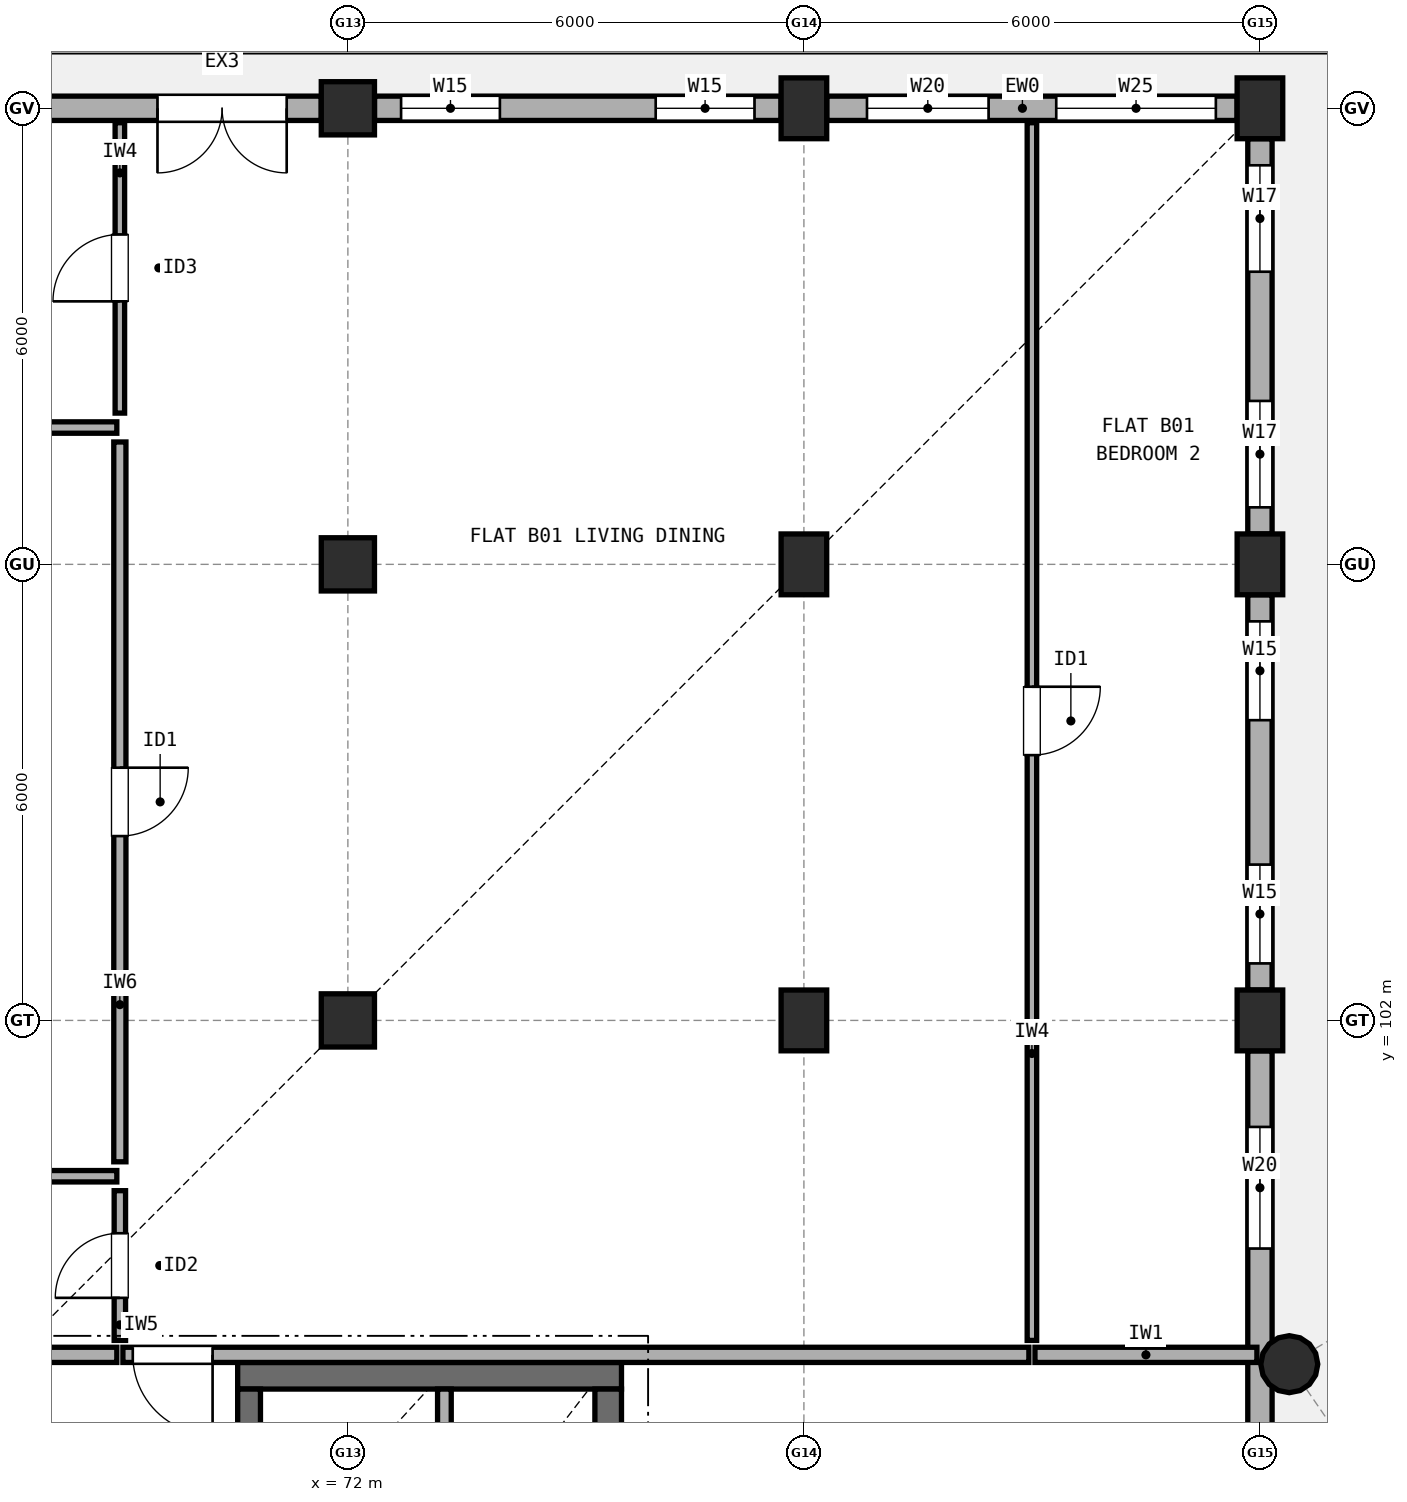
"""IFC4 building model, lengths in metres.
Left out: names, types, materials, properties, quantities, classifications, styles, units other than length and angle.
Written with IfcOpenShell. Run it as: python <this file> out.ifc"""

import sys

from ifc_helpers import new_model, si_unit, direction, frame, frame_2d, origin, origin_2d, place, context, subcontext, project, spatial, rectangle, circle, extrude, element, fill, save


model = new_model("IFC4")
c1 = context("Model", 3, precision=1e-05, world=origin(), true_north=direction((0.0, 1.0)))
c2 = subcontext(c1, "Body", "Model", "MODEL_VIEW")
j1 = project(units=[si_unit("LENGTHUNIT", "METRE"), si_unit("PLANEANGLEUNIT", "RADIAN")], contexts=[c1])
p1 = place(None, origin())
s1 = spatial("IfcSite", under=j1, at=p1, CompositionType="ELEMENT")
p2 = place(p1, origin())
s2 = spatial("IfcBuilding", under=s1, at=p2, CompositionType="ELEMENT")
p3 = place(p2, origin())
s3 = spatial("IfcBuildingStorey", under=s2, at=p3, CompositionType="ELEMENT", Elevation=0.0)
for number, where, z_axis, x_axis in (
    (1, (72.0, 102.0, 0.0), (0.0, 0.0, 1.0), (1.0, 0.0, 0.0)),
    (2, (72.0, 108.0, 0.0), (0.0, 0.0, 1.0), (1.0, 0.0, 0.0)),
    (3, (72.0, 114.0, 0.0), (0.0, 0.0, 1.0), (1.0, 0.0, 0.0)),
):
    element("IfcColumn", number, at=place(p3, frame(where, z_axis=z_axis, x_axis=x_axis)), inside=s3, PredefinedType="COLUMN", context=c2, shape_type="SweptSolid", body=[
        extrude(rectangle(XDim=0.7, YDim=0.7, at=origin_2d()), origin(), (0.0, 0.0, 1.0), 4.23),
    ])
for number, where, z_axis, x_axis in (
    (4, (78.0, 102.0, 0.0), (0.0, 0.0, 1.0), (1.0, 0.0, 0.0)),
    (5, (78.0, 108.0, 0.0), (0.0, 0.0, 1.0), (1.0, 0.0, 0.0)),
    (6, (78.0, 114.0, 0.0), (0.0, 0.0, 1.0), (1.0, 0.0, 0.0)),
    (7, (84.0, 102.0, 0.0), (0.0, 0.0, 1.0), (1.0, 0.0, 0.0)),
    (8, (84.0, 108.0, 0.0), (0.0, 0.0, 1.0), (1.0, 0.0, 0.0)),
    (9, (84.0, 114.0, 0.0), (0.0, 0.0, 1.0), (1.0, 0.0, 0.0)),
):
    element("IfcColumn", number, at=place(p3, frame(where, z_axis=z_axis, x_axis=x_axis)), inside=s3, PredefinedType="COLUMN", context=c2, shape_type="SweptSolid", body=[
        extrude(rectangle(XDim=0.6, YDim=0.8, at=origin_2d()), origin(), (0.0, 0.0, 1.0), 4.23),
    ])
p4 = place(p3, frame((84.386, 97.477, 0.0), z_axis=(0.0, 0.0, 1.0), x_axis=(1.0, 0.0, 0.0)))
e10 = element("IfcColumn", 10, at=p4, inside=s3, PredefinedType="COLUMN", context=c2, shape_type="SweptSolid", body=[
    extrude(circle(Radius=0.375, at=origin_2d()), origin(), (0.0, 0.0, 1.0), 4.248),
])
p5 = place(p3, frame((84.0, 96.4, 0.0), z_axis=(0.0, 0.0, 1.0), x_axis=(0.0, 1.0, 0.0)))
e11 = element("IfcWall", 11, at=p5, inside=s3, PredefinedType="STANDARD", context=c2, shape_type="SweptSolid", body=[
    extrude(rectangle(XDim=5.2, YDim=0.32, at=frame_2d((2.6, 0.0))), origin(), (0.0, 0.0, 1.0), 3.712),
])
p6 = place(p5, frame((2.599, 0.0, 0.9)))
e12 = element("IfcOpeningElement", 12, at=p6, cuts=e11, PredefinedType="OPENING", context=c2, shape_type="SweptSolid", body=[
    extrude(rectangle(XDim=1.6, YDim=1.5, at=frame_2d((0.8, 0.75))), frame((0.0, 0.17, 0.0), z_axis=(0.0, -1.0, 0.0), x_axis=(1.0, 0.0, 0.0)), (0.0, 0.0, 1.0), 0.34),
])
p7 = place(p3, frame((84.0, 102.4, 0.0), z_axis=(0.0, 0.0, 1.0), x_axis=(0.0, 1.0, 0.0)))
e13 = element("IfcWall", 13, at=p7, inside=s3, PredefinedType="STANDARD", context=c2, shape_type="SweptSolid", body=[
    extrude(rectangle(XDim=5.2, YDim=0.32, at=frame_2d((2.6, 0.0))), origin(), (0.0, 0.0, 1.0), 3.712),
])
p8 = place(p7, frame((0.35, 0.0, 0.9)))
e14 = element("IfcOpeningElement", 14, at=p8, cuts=e13, PredefinedType="OPENING", context=c2, shape_type="SweptSolid", body=[
    extrude(rectangle(XDim=1.3, YDim=1.45, at=frame_2d((0.65, 0.725))), frame((0.0, 0.17, 0.0), z_axis=(0.0, -1.0, 0.0), x_axis=(1.0, 0.0, 0.0)), (0.0, 0.0, 1.0), 0.34),
])
p9 = place(p7, frame((3.55, 0.0, 0.9)))
e15 = element("IfcOpeningElement", 15, at=p9, cuts=e13, PredefinedType="OPENING", context=c2, shape_type="SweptSolid", body=[
    extrude(rectangle(XDim=1.3, YDim=1.45, at=frame_2d((0.65, 0.725))), frame((0.0, 0.17, 0.0), z_axis=(0.0, -1.0, 0.0), x_axis=(1.0, 0.0, 0.0)), (0.0, 0.0, 1.0), 0.34),
])
p10 = place(p3, frame((84.0, 108.4, 0.0), z_axis=(0.0, 0.0, 1.0), x_axis=(0.0, 1.0, 0.0)))
e16 = element("IfcWall", 16, at=p10, inside=s3, PredefinedType="STANDARD", context=c2, shape_type="SweptSolid", body=[
    extrude(rectangle(XDim=5.2, YDim=0.32, at=frame_2d((2.6, 0.0))), origin(), (0.0, 0.0, 1.0), 3.712),
])
p11 = place(p10, frame((0.35, 0.0, 0.9)))
e17 = element("IfcOpeningElement", 17, at=p11, cuts=e16, PredefinedType="OPENING", context=c2, shape_type="SweptSolid", body=[
    extrude(rectangle(XDim=1.4, YDim=1.5, at=frame_2d((0.7, 0.75))), frame((0.0, 0.17, 0.0), z_axis=(0.0, -1.0, 0.0), x_axis=(1.0, 0.0, 0.0)), (0.0, 0.0, 1.0), 0.34),
])
p12 = place(p10, frame((3.45, 0.0, 0.9)))
e18 = element("IfcOpeningElement", 18, at=p12, cuts=e16, PredefinedType="OPENING", context=c2, shape_type="SweptSolid", body=[
    extrude(rectangle(XDim=1.4, YDim=1.5, at=frame_2d((0.7, 0.75))), frame((0.0, 0.17, 0.0), z_axis=(0.0, -1.0, 0.0), x_axis=(1.0, 0.0, 0.0)), (0.0, 0.0, 1.0), 0.34),
])
p13 = place(p3, frame((83.7, 114.0, 0.0), z_axis=(0.0, 0.0, 1.0), x_axis=(-1.0, 0.0, 0.0)))
e19 = element("IfcWall", 19, at=p13, inside=s3, PredefinedType="STANDARD", context=c2, shape_type="SweptSolid", body=[
    extrude(rectangle(XDim=5.4, YDim=0.32, at=frame_2d((2.7, 0.0))), origin(), (0.0, 0.0, 1.0), 3.562),
])
p14 = place(p13, frame((0.28, 0.0, 0.9)))
e20 = element("IfcOpeningElement", 20, at=p14, cuts=e19, PredefinedType="OPENING", context=c2, shape_type="SweptSolid", body=[
    extrude(rectangle(XDim=2.1, YDim=1.55, at=frame_2d((1.05, 0.775))), frame((0.0, 0.17, 0.0), z_axis=(0.0, -1.0, 0.0), x_axis=(1.0, 0.0, 0.0)), (0.0, 0.0, 1.0), 0.34),
])
p15 = place(p13, frame((3.27, 0.0, 0.9)))
e21 = element("IfcOpeningElement", 21, at=p15, cuts=e19, PredefinedType="OPENING", context=c2, shape_type="SweptSolid", body=[
    extrude(rectangle(XDim=1.6, YDim=1.5, at=frame_2d((0.8, 0.75))), frame((0.0, 0.17, 0.0), z_axis=(0.0, -1.0, 0.0), x_axis=(1.0, 0.0, 0.0)), (0.0, 0.0, 1.0), 0.34),
])
p16 = place(p3, frame((77.7, 114.0, 0.0), z_axis=(0.0, 0.0, 1.0), x_axis=(-1.0, 0.0, 0.0)))
e22 = element("IfcWall", 22, at=p16, inside=s3, PredefinedType="STANDARD", context=c2, shape_type="SweptSolid", body=[
    extrude(rectangle(XDim=5.35, YDim=0.32, at=frame_2d((2.675, 0.0))), origin(), (0.0, 0.0, 1.0), 3.562),
])
p17 = place(p16, frame((0.35, 0.0, 0.9)))
e23 = element("IfcOpeningElement", 23, at=p17, cuts=e22, PredefinedType="OPENING", context=c2, shape_type="SweptSolid", body=[
    extrude(rectangle(XDim=1.3, YDim=1.45, at=frame_2d((0.65, 0.725))), frame((0.0, 0.17, 0.0), z_axis=(0.0, -1.0, 0.0), x_axis=(1.0, 0.0, 0.0)), (0.0, 0.0, 1.0), 0.34),
])
p18 = place(p16, frame((3.7, 0.0, 0.9)))
e24 = element("IfcOpeningElement", 24, at=p18, cuts=e22, PredefinedType="OPENING", context=c2, shape_type="SweptSolid", body=[
    extrude(rectangle(XDim=1.3, YDim=1.45, at=frame_2d((0.65, 0.725))), frame((0.0, 0.17, 0.0), z_axis=(0.0, -1.0, 0.0), x_axis=(1.0, 0.0, 0.0)), (0.0, 0.0, 1.0), 0.34),
])
p19 = place(p3, frame((71.65, 114.0, 0.0), z_axis=(0.0, 0.0, 1.0), x_axis=(-1.0, 0.0, 0.0)))
e25 = element("IfcWall", 25, at=p19, inside=s3, PredefinedType="STANDARD", context=c2, shape_type="SweptSolid", body=[
    extrude(rectangle(XDim=5.3, YDim=0.32, at=frame_2d((2.65, 0.0))), origin(), (0.0, 0.0, 1.0), 3.562),
])
p20 = place(p19, frame((0.455, 0.0, 0.0)))
e26 = element("IfcOpeningElement", 26, at=p20, cuts=e25, PredefinedType="OPENING", context=c2, shape_type="SweptSolid", body=[
    extrude(rectangle(XDim=1.7, YDim=2.2, at=frame_2d((0.85, 1.1))), frame((0.0, 0.17, 0.0), z_axis=(0.0, -1.0, 0.0), x_axis=(1.0, 0.0, 0.0)), (0.0, 0.0, 1.0), 0.34),
])
p21 = place(p3, frame((75.6, 97.325, 0.0), z_axis=(0.0, 0.0, 1.0), x_axis=(-1.0, 0.0, 0.0)))
e27 = element("IfcWall", 27, at=p21, inside=s3, PredefinedType="SHEAR", context=c2, shape_type="SweptSolid", body=[
    extrude(rectangle(XDim=5.05, YDim=0.35, at=frame_2d((2.525, 0.0))), origin(), (0.0, 0.0, 1.0), 4.23),
])
p22 = place(p3, frame((75.425, 90.75, 0.0), z_axis=(0.0, 0.0, 1.0), x_axis=(0.0, 1.0, 0.0)))
e28 = element("IfcWall", 28, at=p22, inside=s3, PredefinedType="SHEAR", context=c2, shape_type="SweptSolid", body=[
    extrude(rectangle(XDim=6.4, YDim=0.35, at=frame_2d((3.2, 0.0))), origin(), (0.0, 0.0, 1.0), 4.23),
])
p23 = place(p3, frame((70.7, 93.7, 0.0), z_axis=(0.0, 0.0, 1.0), x_axis=(0.0, 1.0, 0.0)))
e29 = element("IfcWall", 29, at=p23, inside=s3, PredefinedType="SHEAR", context=c2, shape_type="SweptSolid", body=[
    extrude(rectangle(XDim=3.45, YDim=0.3, at=frame_2d((1.725, 0.0))), origin(), (0.0, 0.0, 1.0), 4.23),
])
p24 = place(p3, frame((73.27, 94.94, 0.0), z_axis=(0.0, 0.0, 1.0), x_axis=(0.0, 1.0, 0.0)))
e30 = element("IfcWall", 30, at=p24, inside=s3, PredefinedType="SOLIDWALL", context=c2, shape_type="SweptSolid", body=[
    extrude(rectangle(XDim=2.21, YDim=0.18, at=frame_2d((1.105, 0.0))), origin(), (0.0, 0.0, 1.0), 4.23),
])
p25 = place(p3, frame((64.09, 97.6, 0.0), z_axis=(0.0, 0.0, 1.0), x_axis=(1.0, 0.0, 0.0)))
e31 = element("IfcWall", 31, at=p25, inside=s3, PredefinedType="SOLIDWALL", context=c2, shape_type="SweptSolid", body=[
    extrude(rectangle(XDim=4.87, YDim=0.2, at=frame_2d((2.435, 0.0))), origin(), (0.0, 0.0, 1.0), 4.23),
])
p26 = place(p3, frame((69.04, 97.6, 0.0), z_axis=(0.0, 0.0, 1.0), x_axis=(1.0, 0.0, 0.0)))
e32 = element("IfcWall", 32, at=p26, inside=s3, PredefinedType="SOLIDWALL", context=c2, shape_type="SweptSolid", body=[
    extrude(rectangle(XDim=11.92, YDim=0.2, at=frame_2d((5.96, 0.0))), origin(), (0.0, 0.0, 1.0), 3.712),
])
p27 = place(p26, frame((0.13, 0.0, 0.0)))
e33 = element("IfcOpeningElement", 33, at=p27, cuts=e32, PredefinedType="OPENING", context=c2, shape_type="SweptSolid", body=[
    extrude(rectangle(XDim=1.05, YDim=2.15, at=frame_2d((0.525, 1.075))), frame((0.0, 0.11, 0.0), z_axis=(0.0, -1.0, 0.0), x_axis=(1.0, 0.0, 0.0)), (0.0, 0.0, 1.0), 0.22),
])
p28 = place(p3, frame((69.0, 109.99, 0.0), z_axis=(0.0, 0.0, 1.0), x_axis=(0.0, 1.0, 0.0)))
e34 = element("IfcWall", 34, at=p28, inside=s3, PredefinedType="PARTITIONING", context=c2, shape_type="SweptSolid", body=[
    extrude(rectangle(XDim=3.82, YDim=0.125, at=frame_2d((1.91, 0.0))), origin(), (0.0, 0.0, 1.0), 4.23),
])
p29 = place(p28, frame((1.47, 0.0, 0.0)))
e35 = element("IfcOpeningElement", 35, at=p29, cuts=e34, PredefinedType="OPENING", context=c2, shape_type="SweptSolid", body=[
    extrude(rectangle(XDim=0.88, YDim=2.1, at=frame_2d((0.44, 1.05))), frame((0.0, 0.073, 0.0), z_axis=(0.0, -1.0, 0.0), x_axis=(1.0, 0.0, 0.0)), (0.0, 0.0, 1.0), 0.145),
])
p30 = place(p3, frame((69.0, 100.14, 0.0), z_axis=(0.0, 0.0, 1.0), x_axis=(0.0, 1.0, 0.0)))
e36 = element("IfcWall", 36, at=p30, inside=s3, PredefinedType="PLUMBINGWALL", context=c2, shape_type="SweptSolid", body=[
    extrude(rectangle(XDim=9.47, YDim=0.16, at=frame_2d((4.735, 0.0))), origin(), (0.0, 0.0, 1.0), 3.112),
])
p31 = place(p30, frame((4.285, 0.0, 0.0)))
e37 = element("IfcOpeningElement", 37, at=p31, cuts=e36, PredefinedType="OPENING", context=c2, shape_type="SweptSolid", body=[
    extrude(rectangle(XDim=0.9, YDim=2.1, at=frame_2d((0.45, 1.05))), frame((0.0, 0.09, 0.0), z_axis=(0.0, -1.0, 0.0), x_axis=(1.0, 0.0, 0.0)), (0.0, 0.0, 1.0), 0.18),
])
p32 = place(p3, frame((69.0, 97.79, 0.0), z_axis=(0.0, 0.0, 1.0), x_axis=(0.0, 1.0, 0.0)))
e38 = element("IfcWall", 38, at=p32, inside=s3, PredefinedType="PARTITIONING", context=c2, shape_type="SweptSolid", body=[
    extrude(rectangle(XDim=1.97, YDim=0.15, at=frame_2d((0.985, 0.0))), origin(), (0.0, 0.0, 1.0), 4.23),
])
p33 = place(p32, frame((0.56, 0.0, 0.0)))
e39 = element("IfcOpeningElement", 39, at=p33, cuts=e38, PredefinedType="OPENING", context=c2, shape_type="SweptSolid", body=[
    extrude(rectangle(XDim=0.85, YDim=2.1, at=frame_2d((0.425, 1.05))), frame((0.0, 0.085, 0.0), z_axis=(0.0, -1.0, 0.0), x_axis=(1.0, 0.0, 0.0)), (0.0, 0.0, 1.0), 0.17),
])
p34 = place(p3, frame((64.09, 109.8, 0.0), z_axis=(0.0, 0.0, 1.0), x_axis=(1.0, 0.0, 0.0)))
e40 = element("IfcWall", 40, at=p34, inside=s3, PredefinedType="PARTITIONING", context=c2, shape_type="SweptSolid", body=[
    extrude(rectangle(XDim=4.87, YDim=0.15, at=frame_2d((2.435, 0.0))), origin(), (0.0, 0.0, 1.0), 3.612),
])
p35 = place(p3, frame((64.09, 99.95, 0.0), z_axis=(0.0, 0.0, 1.0), x_axis=(1.0, 0.0, 0.0)))
e41 = element("IfcWall", 41, at=p35, inside=s3, PredefinedType="PARTITIONING", context=c2, shape_type="SweptSolid", body=[
    extrude(rectangle(XDim=4.87, YDim=0.15, at=frame_2d((2.435, 0.0))), origin(), (0.0, 0.0, 1.0), 4.23),
])
p36 = place(p3, frame((81.04, 97.6, 0.0), z_axis=(0.0, 0.0, 1.0), x_axis=(1.0, 0.0, 0.0)))
e42 = element("IfcWall", 42, at=p36, inside=s3, PredefinedType="SOLIDWALL", context=c2, shape_type="SweptSolid", body=[
    extrude(rectangle(XDim=2.92, YDim=0.2, at=frame_2d((1.46, 0.0))), origin(), (0.0, 0.0, 1.0), 3.712),
])
p37 = place(p3, frame((81.0, 97.79, 0.0), z_axis=(0.0, 0.0, 1.0), x_axis=(0.0, 1.0, 0.0)))
e43 = element("IfcWall", 43, at=p37, inside=s3, PredefinedType="PARTITIONING", context=c2, shape_type="SweptSolid", body=[
    extrude(rectangle(XDim=16.02, YDim=0.125, at=frame_2d((8.01, 0.0))), origin(), (0.0, 0.0, 1.0), 3.112),
])
p38 = place(p37, frame((7.7, 0.0, 0.0)))
e44 = element("IfcOpeningElement", 44, at=p38, cuts=e43, PredefinedType="OPENING", context=c2, shape_type="SweptSolid", body=[
    extrude(rectangle(XDim=0.9, YDim=2.1, at=frame_2d((0.45, 1.05))), frame((0.0, 0.073, 0.0), z_axis=(0.0, -1.0, 0.0), x_axis=(1.0, 0.0, 0.0)), (0.0, 0.0, 1.0), 0.145),
])
p39 = place(p6, origin())
e45 = element("IfcWindow", 45, at=p39, inside=s3, PartitioningType="SINGLE_PANEL", PredefinedType="WINDOW", context=c2, shape_type="SweptSolid", body=[
    extrude(rectangle(XDim=1.6, YDim=1.5, at=frame_2d((0.8, 0.75))), frame((0.0, 0.03, 0.0), z_axis=(0.0, -1.0, 0.0), x_axis=(1.0, 0.0, 0.0)), (0.0, 0.0, 1.0), 0.06),
])
fill(e12, e45)
p40 = place(p8, origin())
e46 = element("IfcWindow", 46, at=p40, inside=s3, PartitioningType="SINGLE_PANEL", PredefinedType="WINDOW", context=c2, shape_type="SweptSolid", body=[
    extrude(rectangle(XDim=1.3, YDim=1.45, at=frame_2d((0.65, 0.725))), frame((0.0, 0.03, 0.0), z_axis=(0.0, -1.0, 0.0), x_axis=(1.0, 0.0, 0.0)), (0.0, 0.0, 1.0), 0.06),
])
fill(e14, e46)
p41 = place(p9, origin())
e47 = element("IfcWindow", 47, at=p41, inside=s3, PartitioningType="SINGLE_PANEL", PredefinedType="WINDOW", context=c2, shape_type="SweptSolid", body=[
    extrude(rectangle(XDim=1.3, YDim=1.45, at=frame_2d((0.65, 0.725))), frame((0.0, 0.03, 0.0), z_axis=(0.0, -1.0, 0.0), x_axis=(1.0, 0.0, 0.0)), (0.0, 0.0, 1.0), 0.06),
])
fill(e15, e47)
p42 = place(p11, origin())
e48 = element("IfcWindow", 48, at=p42, inside=s3, PartitioningType="SINGLE_PANEL", PredefinedType="WINDOW", context=c2, shape_type="SweptSolid", body=[
    extrude(rectangle(XDim=1.4, YDim=1.5, at=frame_2d((0.7, 0.75))), frame((0.0, 0.03, 0.0), z_axis=(0.0, -1.0, 0.0), x_axis=(1.0, 0.0, 0.0)), (0.0, 0.0, 1.0), 0.06),
])
fill(e17, e48)
p43 = place(p12, origin())
e49 = element("IfcWindow", 49, at=p43, inside=s3, PartitioningType="SINGLE_PANEL", PredefinedType="WINDOW", context=c2, shape_type="SweptSolid", body=[
    extrude(rectangle(XDim=1.4, YDim=1.5, at=frame_2d((0.7, 0.75))), frame((0.0, 0.03, 0.0), z_axis=(0.0, -1.0, 0.0), x_axis=(1.0, 0.0, 0.0)), (0.0, 0.0, 1.0), 0.06),
])
fill(e18, e49)
p44 = place(p14, origin())
e50 = element("IfcWindow", 50, at=p44, inside=s3, PartitioningType="SINGLE_PANEL", PredefinedType="WINDOW", context=c2, shape_type="SweptSolid", body=[
    extrude(rectangle(XDim=2.1, YDim=1.55, at=frame_2d((1.05, 0.775))), frame((0.0, 0.03, 0.0), z_axis=(0.0, -1.0, 0.0), x_axis=(1.0, 0.0, 0.0)), (0.0, 0.0, 1.0), 0.06),
])
fill(e20, e50)
p45 = place(p15, origin())
e51 = element("IfcWindow", 51, at=p45, inside=s3, PartitioningType="SINGLE_PANEL", PredefinedType="WINDOW", context=c2, shape_type="SweptSolid", body=[
    extrude(rectangle(XDim=1.6, YDim=1.5, at=frame_2d((0.8, 0.75))), frame((0.0, 0.03, 0.0), z_axis=(0.0, -1.0, 0.0), x_axis=(1.0, 0.0, 0.0)), (0.0, 0.0, 1.0), 0.06),
])
fill(e21, e51)
p46 = place(p17, origin())
e52 = element("IfcWindow", 52, at=p46, inside=s3, PartitioningType="SINGLE_PANEL", PredefinedType="WINDOW", context=c2, shape_type="SweptSolid", body=[
    extrude(rectangle(XDim=1.3, YDim=1.45, at=frame_2d((0.65, 0.725))), frame((0.0, 0.03, 0.0), z_axis=(0.0, -1.0, 0.0), x_axis=(1.0, 0.0, 0.0)), (0.0, 0.0, 1.0), 0.06),
])
fill(e23, e52)
p47 = place(p18, origin())
e53 = element("IfcWindow", 53, at=p47, inside=s3, PartitioningType="SINGLE_PANEL", PredefinedType="WINDOW", context=c2, shape_type="SweptSolid", body=[
    extrude(rectangle(XDim=1.3, YDim=1.45, at=frame_2d((0.65, 0.725))), frame((0.0, 0.03, 0.0), z_axis=(0.0, -1.0, 0.0), x_axis=(1.0, 0.0, 0.0)), (0.0, 0.0, 1.0), 0.06),
])
fill(e24, e53)
p48 = place(p20, frame((1.7, 0.0, 0.0), z_axis=(0.0, 0.0, 1.0), x_axis=(-1.0, 0.0, 0.0)))
e54 = element("IfcDoor", 54, at=p48, inside=s3, OperationType="DOUBLE_DOOR_SINGLE_SWING", PredefinedType="DOOR", context=c2, shape_type="SweptSolid", body=[
    extrude(rectangle(XDim=1.7, YDim=2.2, at=frame_2d((0.85, 1.1))), frame((0.0, 0.025, 0.0), z_axis=(0.0, -1.0, 0.0), x_axis=(1.0, 0.0, 0.0)), (0.0, 0.0, 1.0), 0.05),
])
fill(e26, e54)
p49 = place(p27, origin())
e55 = element("IfcDoor", 55, at=p49, inside=s3, OperationType="SINGLE_SWING_RIGHT", PredefinedType="DOOR", context=c2, shape_type="SweptSolid", body=[
    extrude(rectangle(XDim=1.05, YDim=2.15, at=frame_2d((0.525, 1.075))), frame((0.0, 0.025, 0.0), z_axis=(0.0, -1.0, 0.0), x_axis=(1.0, 0.0, 0.0)), (0.0, 0.0, 1.0), 0.05),
])
fill(e33, e55)
p50 = place(p29, origin())
e56 = element("IfcDoor", 56, at=p50, inside=s3, OperationType="SINGLE_SWING_LEFT", PredefinedType="DOOR", context=c2, shape_type="SweptSolid", body=[
    extrude(rectangle(XDim=0.88, YDim=2.1, at=frame_2d((0.44, 1.05))), frame((0.0, 0.025, 0.0), z_axis=(0.0, -1.0, 0.0), x_axis=(1.0, 0.0, 0.0)), (0.0, 0.0, 1.0), 0.05),
])
fill(e35, e56)
p51 = place(p31, origin())
e57 = element("IfcDoor", 57, at=p51, inside=s3, OperationType="SINGLE_SWING_RIGHT", PredefinedType="DOOR", context=c2, shape_type="SweptSolid", body=[
    extrude(rectangle(XDim=0.9, YDim=2.1, at=frame_2d((0.45, 1.05))), frame((0.0, 0.025, 0.0), z_axis=(0.0, -1.0, 0.0), x_axis=(1.0, 0.0, 0.0)), (0.0, 0.0, 1.0), 0.05),
])
fill(e37, e57)
p52 = place(p33, origin())
e58 = element("IfcDoor", 58, at=p52, inside=s3, OperationType="SINGLE_SWING_LEFT", PredefinedType="DOOR", context=c2, shape_type="SweptSolid", body=[
    extrude(rectangle(XDim=0.85, YDim=2.1, at=frame_2d((0.425, 1.05))), frame((0.0, 0.025, 0.0), z_axis=(0.0, -1.0, 0.0), x_axis=(1.0, 0.0, 0.0)), (0.0, 0.0, 1.0), 0.05),
])
fill(e39, e58)
p53 = place(p38, origin())
e59 = element("IfcDoor", 59, at=p53, inside=s3, OperationType="SINGLE_SWING_RIGHT", PredefinedType="DOOR", context=c2, shape_type="SweptSolid", body=[
    extrude(rectangle(XDim=0.9, YDim=2.1, at=frame_2d((0.45, 1.05))), frame((0.0, 0.025, 0.0), z_axis=(0.0, -1.0, 0.0), x_axis=(1.0, 0.0, 0.0)), (0.0, 0.0, 1.0), 0.05),
])
fill(e44, e59)
save(model, sys.argv[1])
